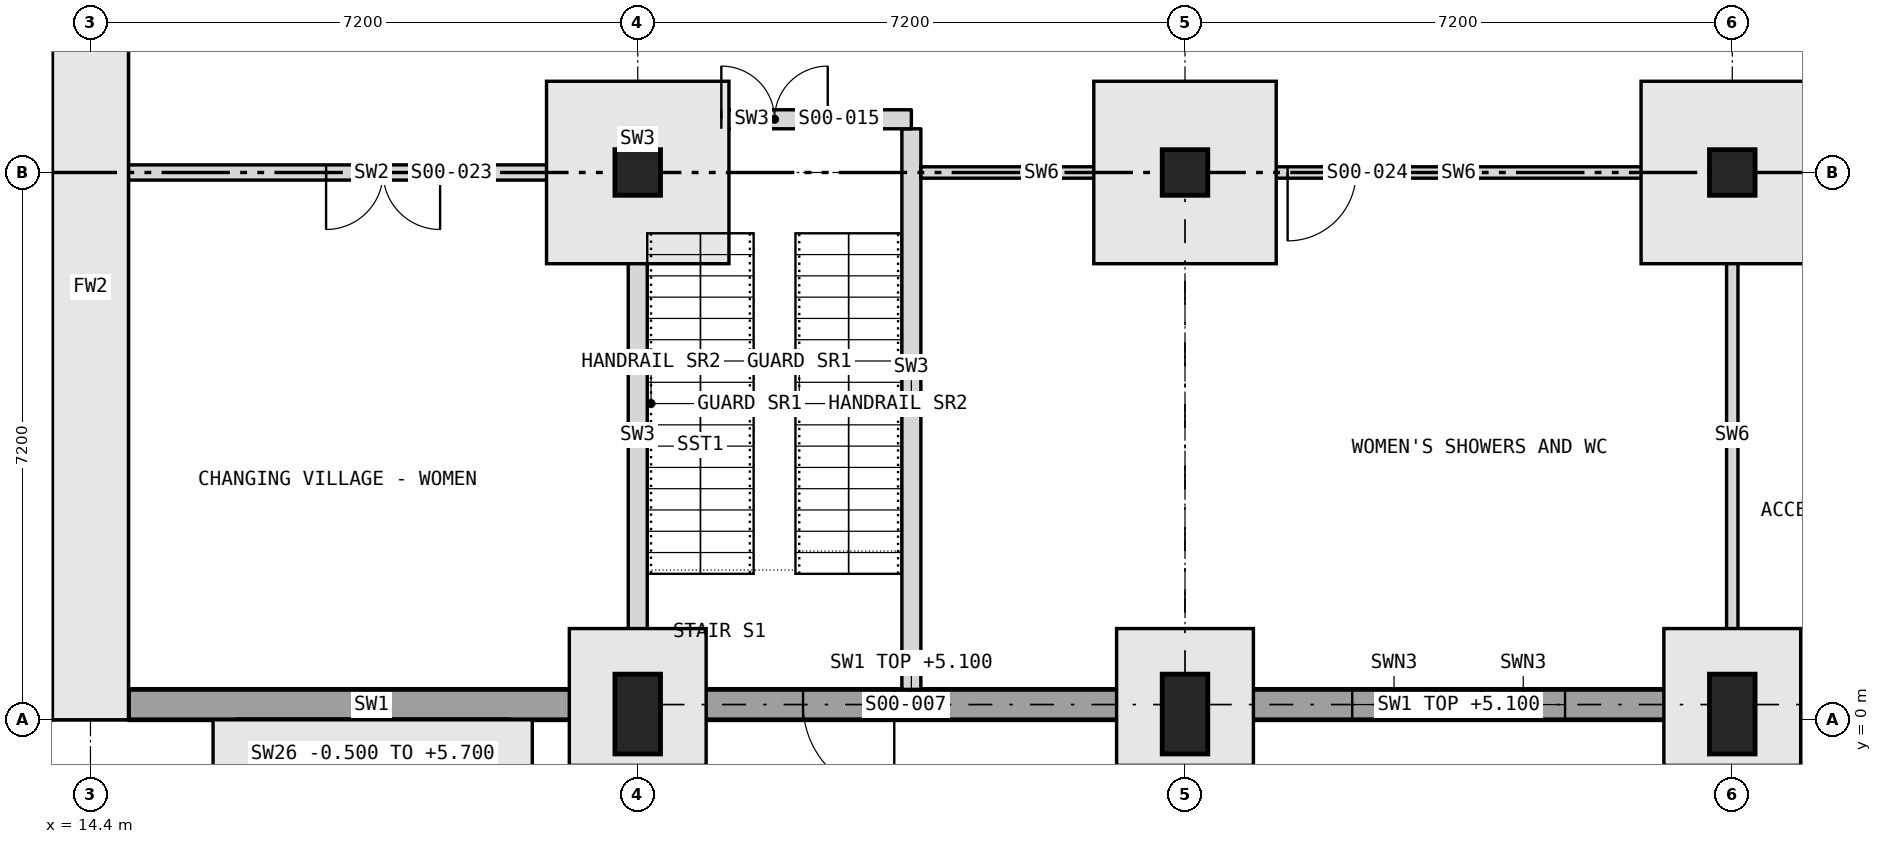
"""IFC4 building model, lengths in metres.
Left out: names, types, materials, properties, quantities, classifications, styles, units other than length and angle.
Written with IfcOpenShell. Run it as: python <this file> out.ifc"""

import sys

from ifc_helpers import new_model, si_unit, direction, frame, frame_2d, origin, origin_2d, place, context, subcontext, project, spatial, rectangle, extrude, element, fill, save


model = new_model("IFC4")
c1 = context("Model", 3, precision=1e-05, world=origin(), true_north=direction((0.0, 1.0)))
c2 = subcontext(c1, "Body", "Model", "MODEL_VIEW")
j1 = project(units=[si_unit("LENGTHUNIT", "METRE"), si_unit("PLANEANGLEUNIT", "RADIAN")], contexts=[c1])
p1 = place(None, origin())
s1 = spatial("IfcSite", under=j1, at=p1, CompositionType="ELEMENT")
p2 = place(p1, origin())
s2 = spatial("IfcBuilding", under=s1, at=p2, CompositionType="ELEMENT")
p3 = place(p2, origin())
s3 = spatial("IfcBuildingStorey", under=s2, at=p3, CompositionType="ELEMENT", Elevation=0.0)
p4 = place(p3, frame((21.6, 0.075, -0.45), z_axis=(0.0, 0.0, 1.0), x_axis=(1.0, 0.0, 0.0)))
e1 = element("IfcColumn", 1, at=p4, inside=s3, PredefinedType="COLUMN", context=c2, shape_type="SweptSolid", body=[
    extrude(rectangle(XDim=0.6, YDim=1.05, at=origin_2d()), origin(), (0.0, 0.0, 1.0), 6.45),
])
p5 = place(p3, frame((21.6, 7.2, -0.405), z_axis=(0.0, 0.0, 1.0), x_axis=(1.0, 0.0, 0.0)))
e2 = element("IfcColumn", 2, at=p5, inside=s3, PredefinedType="COLUMN", context=c2, shape_type="SweptSolid", body=[
    extrude(rectangle(XDim=0.6, YDim=0.6, at=origin_2d()), origin(), (0.0, 0.0, 1.0), 6.405),
])
p6 = place(p3, frame((28.8, 0.075, -0.45), z_axis=(0.0, 0.0, 1.0), x_axis=(1.0, 0.0, 0.0)))
e3 = element("IfcColumn", 3, at=p6, inside=s3, PredefinedType="COLUMN", context=c2, shape_type="SweptSolid", body=[
    extrude(rectangle(XDim=0.6, YDim=1.05, at=origin_2d()), origin(), (0.0, 0.0, 1.0), 6.45),
])
p7 = place(p3, frame((28.8, 7.2, -0.405), z_axis=(0.0, 0.0, 1.0), x_axis=(1.0, 0.0, 0.0)))
e4 = element("IfcColumn", 4, at=p7, inside=s3, PredefinedType="COLUMN", context=c2, shape_type="SweptSolid", body=[
    extrude(rectangle(XDim=0.6, YDim=0.6, at=origin_2d()), origin(), (0.0, 0.0, 1.0), 6.405),
])
p8 = place(p3, frame((36.0, 0.075, -0.45), z_axis=(0.0, 0.0, 1.0), x_axis=(1.0, 0.0, 0.0)))
e5 = element("IfcColumn", 5, at=p8, inside=s3, PredefinedType="COLUMN", context=c2, shape_type="SweptSolid", body=[
    extrude(rectangle(XDim=0.6, YDim=1.05, at=origin_2d()), origin(), (0.0, 0.0, 1.0), 6.45),
])
p9 = place(p3, frame((36.0, 7.2, -0.405), z_axis=(0.0, 0.0, 1.0), x_axis=(1.0, 0.0, 0.0)))
e6 = element("IfcColumn", 6, at=p9, inside=s3, PredefinedType="COLUMN", context=c2, shape_type="SweptSolid", body=[
    extrude(rectangle(XDim=0.6, YDim=0.6, at=origin_2d()), origin(), (0.0, 0.0, 1.0), 6.405),
])
p10 = place(p3, frame((14.9, 0.2, 0.0), z_axis=(0.0, 0.0, 1.0), x_axis=(1.0, 0.0, 0.0)))
e7 = element("IfcWall", 7, at=p10, inside=s3, PredefinedType="SOLIDWALL", context=c2, shape_type="SweptSolid", body=[
    extrude(rectangle(XDim=6.4, YDim=0.4, at=frame_2d((3.2, 0.0))), origin(), (0.0, 0.0, 1.0), 5.7),
])
p11 = place(p3, frame((21.9, 0.2, 0.0), z_axis=(0.0, 0.0, 1.0), x_axis=(1.0, 0.0, 0.0)))
e8 = element("IfcWall", 8, at=p11, inside=s3, PredefinedType="SOLIDWALL", context=c2, shape_type="SweptSolid", body=[
    extrude(rectangle(XDim=6.6, YDim=0.4, at=frame_2d((3.3, 0.0))), origin(), (0.0, 0.0, 1.0), 5.1),
])
p12 = place(p11, frame((1.875, 0.0, 0.0)))
e9 = element("IfcOpeningElement", 9, at=p12, cuts=e8, PredefinedType="OPENING", context=c2, shape_type="SweptSolid", body=[
    extrude(rectangle(XDim=1.2, YDim=2.1, at=frame_2d((0.6, 1.05))), frame((0.0, 0.21, 0.0), z_axis=(0.0, -1.0, 0.0), x_axis=(1.0, 0.0, 0.0)), (0.0, 0.0, 1.0), 0.42),
])
p13 = place(p3, frame((29.1, 0.2, 0.0), z_axis=(0.0, 0.0, 1.0), x_axis=(1.0, 0.0, 0.0)))
e10 = element("IfcWall", 10, at=p13, inside=s3, PredefinedType="SOLIDWALL", context=c2, shape_type="SweptSolid", body=[
    extrude(rectangle(XDim=6.6, YDim=0.4, at=frame_2d((3.3, 0.0))), origin(), (0.0, 0.0, 1.0), 5.1),
])
p14 = place(p13, frame((1.9, 0.0, 2.4)))
e11 = element("IfcOpeningElement", 11, at=p14, cuts=e10, PredefinedType="OPENING", context=c2, shape_type="SweptSolid", body=[
    extrude(rectangle(XDim=1.1, YDim=1.2, at=frame_2d((0.55, 0.6))), frame((0.0, 0.21, 0.0), z_axis=(0.0, -1.0, 0.0), x_axis=(1.0, 0.0, 0.0)), (0.0, 0.0, 1.0), 0.42),
])
p15 = place(p13, frame((3.6, 0.0, 2.4)))
e12 = element("IfcOpeningElement", 12, at=p15, cuts=e10, PredefinedType="OPENING", context=c2, shape_type="SweptSolid", body=[
    extrude(rectangle(XDim=1.1, YDim=1.2, at=frame_2d((0.55, 0.6))), frame((0.0, 0.21, 0.0), z_axis=(0.0, -1.0, 0.0), x_axis=(1.0, 0.0, 0.0)), (0.0, 0.0, 1.0), 0.42),
])
p16 = place(p3, frame((36.3, 0.2, 0.0), z_axis=(0.0, 0.0, 1.0), x_axis=(1.0, 0.0, 0.0)))
e13 = element("IfcWall", 13, at=p16, inside=s3, PredefinedType="SOLIDWALL", context=c2, shape_type="SweptSolid", body=[
    extrude(rectangle(XDim=6.6, YDim=0.4, at=frame_2d((3.3, 0.0))), origin(), (0.0, 0.0, 1.0), 5.1),
])
p17 = place(p3, frame((16.313, -0.45, -0.5), z_axis=(0.0, 0.0, 1.0), x_axis=(1.0, 0.0, 0.0)))
e14 = element("IfcWall", 14, at=p17, inside=s3, PredefinedType="SOLIDWALL", context=c2, shape_type="SweptSolid", body=[
    extrude(rectangle(XDim=3.6, YDim=0.9, at=frame_2d((1.8, 0.0))), origin(), (0.0, 0.0, 1.0), 6.2),
])
p18 = place(p3, frame((14.4, 0.0, 0.0), z_axis=(0.0, 0.0, 1.0), x_axis=(0.0, 1.0, 0.0)))
e15 = element("IfcWall", 15, at=p18, inside=s3, PredefinedType="SOLIDWALL", context=c2, shape_type="SweptSolid", body=[
    extrude(rectangle(XDim=11.4, YDim=1.0, at=frame_2d((5.7, 0.0))), origin(), (0.0, 0.0, 1.0), 6.0),
])
p19 = place(p3, frame((21.6, 0.6, 0.0), z_axis=(0.0, 0.0, 1.0), x_axis=(0.0, 1.0, 0.0)))
e16 = element("IfcWall", 16, at=p19, inside=s3, PredefinedType="SOLIDWALL", context=c2, shape_type="SweptSolid", body=[
    extrude(rectangle(XDim=6.3, YDim=0.25, at=frame_2d((3.15, 0.0))), origin(), (0.0, 0.0, 1.0), 5.7),
])
p20 = place(p3, frame((21.6, 7.5, 0.0), z_axis=(0.0, 0.0, 1.0), x_axis=(0.0, 1.0, 0.0)))
e17 = element("IfcWall", 17, at=p20, inside=s3, PredefinedType="SOLIDWALL", context=c2, shape_type="SweptSolid", body=[
    extrude(rectangle(XDim=0.275, YDim=0.25, at=frame_2d((0.137, 0.0))), origin(), (0.0, 0.0, 1.0), 5.7),
])
p21 = place(p3, frame((25.2, 0.4, 0.0), z_axis=(0.0, 0.0, 1.0), x_axis=(0.0, 1.0, 0.0)))
e18 = element("IfcWall", 18, at=p21, inside=s3, PredefinedType="SOLIDWALL", context=c2, shape_type="SweptSolid", body=[
    extrude(rectangle(XDim=7.375, YDim=0.25, at=frame_2d((3.688, 0.0))), origin(), (0.0, 0.0, 1.0), 5.7),
])
p22 = place(p3, frame((36.0, 0.6, 0.0), z_axis=(0.0, 0.0, 1.0), x_axis=(0.0, 1.0, 0.0)))
e19 = element("IfcWall", 19, at=p22, inside=s3, PredefinedType="PARTITIONING", context=c2, shape_type="SweptSolid", body=[
    extrude(rectangle(XDim=6.3, YDim=0.15, at=frame_2d((3.15, 0.0))), origin(), (0.0, 0.0, 1.0), 5.7),
])
p23 = place(p3, frame((25.325, 7.2, 0.0), z_axis=(0.0, 0.0, 1.0), x_axis=(1.0, 0.0, 0.0)))
e20 = element("IfcWall", 20, at=p23, inside=s3, PredefinedType="PARTITIONING", context=c2, shape_type="SweptSolid", body=[
    extrude(rectangle(XDim=3.175, YDim=0.15, at=frame_2d((1.587, 0.0))), origin(), (0.0, 0.0, 1.0), 5.7),
])
p24 = place(p3, frame((29.1, 7.2, 0.0), z_axis=(0.0, 0.0, 1.0), x_axis=(1.0, 0.0, 0.0)))
e21 = element("IfcWall", 21, at=p24, inside=s3, PredefinedType="PARTITIONING", context=c2, shape_type="SweptSolid", body=[
    extrude(rectangle(XDim=6.6, YDim=0.15, at=frame_2d((3.3, 0.0))), origin(), (0.0, 0.0, 1.0), 5.7),
])
p25 = place(p24, frame((1.05, 0.0, 0.0)))
e22 = element("IfcOpeningElement", 22, at=p25, cuts=e21, PredefinedType="OPENING", context=c2, shape_type="SweptSolid", body=[
    extrude(rectangle(XDim=0.9, YDim=2.1, at=frame_2d((0.45, 1.05))), frame((0.0, 0.085, 0.0), z_axis=(0.0, -1.0, 0.0), x_axis=(1.0, 0.0, 0.0)), (0.0, 0.0, 1.0), 0.17),
])
p26 = place(p3, frame((14.9, 7.2, 0.0), z_axis=(0.0, 0.0, 1.0), x_axis=(1.0, 0.0, 0.0)))
e23 = element("IfcWall", 23, at=p26, inside=s3, PredefinedType="PARTITIONING", context=c2, shape_type="SweptSolid", body=[
    extrude(rectangle(XDim=6.4, YDim=0.2, at=frame_2d((3.2, 0.0))), origin(), (0.0, 0.0, 1.0), 5.7),
])
p27 = place(p26, frame((2.6, 0.0, 0.0)))
e24 = element("IfcOpeningElement", 24, at=p27, cuts=e23, PredefinedType="OPENING", context=c2, shape_type="SweptSolid", body=[
    extrude(rectangle(XDim=1.5, YDim=2.1, at=frame_2d((0.75, 1.05))), frame((0.0, 0.11, 0.0), z_axis=(0.0, -1.0, 0.0), x_axis=(1.0, 0.0, 0.0)), (0.0, 0.0, 1.0), 0.22),
])
p28 = place(p3, frame((36.3, 7.2, 0.0), z_axis=(0.0, 0.0, 1.0), x_axis=(1.0, 0.0, 0.0)))
e25 = element("IfcWall", 25, at=p28, inside=s3, PredefinedType="PARTITIONING", context=c2, shape_type="SweptSolid", body=[
    extrude(rectangle(XDim=3.3, YDim=0.2, at=frame_2d((1.65, 0.0))), origin(), (0.0, 0.0, 1.0), 5.7),
])
p29 = place(p28, frame((0.875, 0.0, 0.0)))
e26 = element("IfcOpeningElement", 26, at=p29, cuts=e25, PredefinedType="OPENING", context=c2, shape_type="SweptSolid", body=[
    extrude(rectangle(XDim=1.25, YDim=2.1, at=frame_2d((0.625, 1.05))), frame((0.0, 0.11, 0.0), z_axis=(0.0, -1.0, 0.0), x_axis=(1.0, 0.0, 0.0)), (0.0, 0.0, 1.0), 0.22),
])
p30 = place(p3, frame((21.6, 7.9, 0.0), z_axis=(0.0, 0.0, 1.0), x_axis=(1.0, 0.0, 0.0)))
e27 = element("IfcWall", 27, at=p30, inside=s3, PredefinedType="SOLIDWALL", context=c2, shape_type="SweptSolid", body=[
    extrude(rectangle(XDim=3.6, YDim=0.25, at=frame_2d((1.8, 0.0))), origin(), (0.0, 0.0, 1.0), 5.7),
])
p31 = place(p30, frame((1.1, 0.0, 0.0)))
e28 = element("IfcOpeningElement", 28, at=p31, cuts=e27, PredefinedType="OPENING", context=c2, shape_type="SweptSolid", body=[
    extrude(rectangle(XDim=1.4, YDim=2.1, at=frame_2d((0.7, 1.05))), frame((0.0, 0.135, 0.0), z_axis=(0.0, -1.0, 0.0), x_axis=(1.0, 0.0, 0.0)), (0.0, 0.0, 1.0), 0.27),
])
p32 = place(p14, origin())
e29 = element("IfcWindow", 29, at=p32, inside=s3, PartitioningType="DOUBLE_PANEL_VERTICAL", PredefinedType="WINDOW", context=c2, shape_type="SweptSolid", body=[
    extrude(rectangle(XDim=1.1, YDim=1.2, at=frame_2d((0.55, 0.6))), frame((0.0, 0.16, 0.0), z_axis=(0.0, -1.0, 0.0), x_axis=(1.0, 0.0, 0.0)), (0.0, 0.0, 1.0), 0.06),
])
fill(e11, e29)
p33 = place(p15, origin())
e30 = element("IfcWindow", 30, at=p33, inside=s3, PartitioningType="DOUBLE_PANEL_VERTICAL", PredefinedType="WINDOW", context=c2, shape_type="SweptSolid", body=[
    extrude(rectangle(XDim=1.1, YDim=1.2, at=frame_2d((0.55, 0.6))), frame((0.0, 0.16, 0.0), z_axis=(0.0, -1.0, 0.0), x_axis=(1.0, 0.0, 0.0)), (0.0, 0.0, 1.0), 0.06),
])
fill(e12, e30)
p34 = place(p12, frame((1.2, 0.0, 0.0), z_axis=(0.0, 0.0, 1.0), x_axis=(-1.0, 0.0, 0.0)))
e31 = element("IfcDoor", 31, at=p34, inside=s3, OperationType="SINGLE_SWING_LEFT", PredefinedType="DOOR", context=c2, shape_type="SweptSolid", body=[
    extrude(rectangle(XDim=1.2, YDim=2.1, at=frame_2d((0.6, 1.05))), frame((0.0, 0.025, 0.0), z_axis=(0.0, -1.0, 0.0), x_axis=(1.0, 0.0, 0.0)), (0.0, 0.0, 1.0), 0.05),
])
fill(e9, e31)
p35 = place(p31, origin())
e32 = element("IfcDoor", 32, at=p35, inside=s3, OperationType="DOUBLE_DOOR_SINGLE_SWING", PredefinedType="DOOR", context=c2, shape_type="SweptSolid", body=[
    extrude(rectangle(XDim=1.4, YDim=2.1, at=frame_2d((0.7, 1.05))), frame((0.0, 0.025, 0.0), z_axis=(0.0, -1.0, 0.0), x_axis=(1.0, 0.0, 0.0)), (0.0, 0.0, 1.0), 0.05),
])
fill(e28, e32)
p36 = place(p27, frame((1.5, 0.0, 0.0), z_axis=(0.0, 0.0, 1.0), x_axis=(-1.0, 0.0, 0.0)))
e33 = element("IfcDoor", 33, at=p36, inside=s3, OperationType="DOUBLE_DOOR_SINGLE_SWING", PredefinedType="DOOR", context=c2, shape_type="SweptSolid", body=[
    extrude(rectangle(XDim=1.5, YDim=2.1, at=frame_2d((0.75, 1.05))), frame((0.0, 0.025, 0.0), z_axis=(0.0, -1.0, 0.0), x_axis=(1.0, 0.0, 0.0)), (0.0, 0.0, 1.0), 0.05),
])
fill(e24, e33)
p37 = place(p25, frame((0.9, 0.0, 0.0), z_axis=(0.0, 0.0, 1.0), x_axis=(-1.0, 0.0, 0.0)))
e34 = element("IfcDoor", 34, at=p37, inside=s3, OperationType="SINGLE_SWING_RIGHT", PredefinedType="DOOR", context=c2, shape_type="SweptSolid", body=[
    extrude(rectangle(XDim=0.9, YDim=2.1, at=frame_2d((0.45, 1.05))), frame((0.0, 0.025, 0.0), z_axis=(0.0, -1.0, 0.0), x_axis=(1.0, 0.0, 0.0)), (0.0, 0.0, 1.0), 0.05),
])
fill(e22, e34)
save(model, sys.argv[1])
